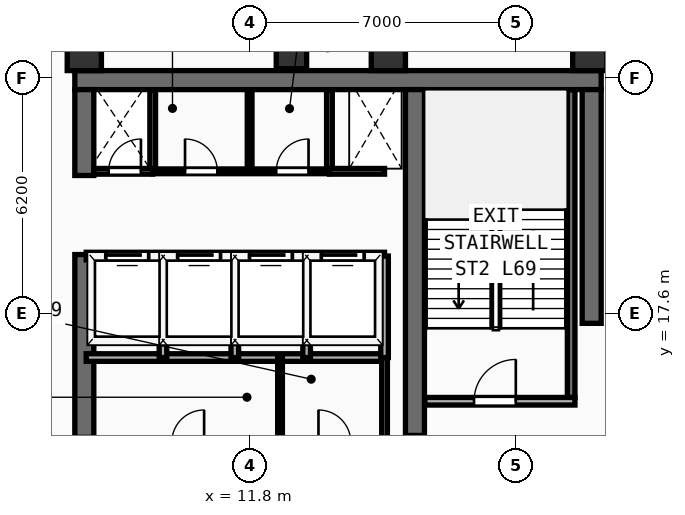
"""IFC4 building model, lengths in metres.
Left out: names, types, materials, properties, quantities, classifications, styles, units other than length and angle.
Written with IfcOpenShell. Run it as: python <this file> out.ifc"""

import sys

from ifc_helpers import new_model, si_unit, direction, frame, frame_2d, origin, origin_2d, place, context, subcontext, project, spatial, rectangle, extrude, element, fill, save


model = new_model("IFC4")
c1 = context("Model", 3, precision=1e-05, world=origin(), true_north=direction((0.0, 1.0)))
c2 = subcontext(c1, "Body", "Model", "MODEL_VIEW")
j1 = project(units=[si_unit("LENGTHUNIT", "METRE"), si_unit("PLANEANGLEUNIT", "RADIAN")], contexts=[c1])
p1 = place(None, origin())
s1 = spatial("IfcSite", under=j1, at=p1, CompositionType="ELEMENT")
p2 = place(p1, origin())
s2 = spatial("IfcBuilding", under=s1, at=p2, CompositionType="ELEMENT")
p3 = place(p2, frame((0.0, 0.0, 270.4)))
s3 = spatial("IfcBuildingStorey", under=s2, at=p3, CompositionType="ELEMENT", Elevation=270.4)
p4 = place(p3, frame((7.2, 23.75, 0.0), z_axis=(0.0, 0.0, 1.0), x_axis=(1.0, 0.0, 0.0)))
e1 = element("IfcWall", 1, at=p4, inside=s3, PredefinedType="SHEAR", context=c2, shape_type="SweptSolid", body=[
    extrude(rectangle(XDim=13.85, YDim=0.5, at=frame_2d((6.925, 0.0))), origin(), (0.0, 0.0, 1.0), 3.56),
])
p5 = place(p3, frame((7.45, 14.35, 0.0), z_axis=(0.0, 0.0, 1.0), x_axis=(0.0, 1.0, 0.0)))
e2 = element("IfcWall", 2, at=p5, inside=s3, PredefinedType="SHEAR", context=c2, shape_type="SweptSolid", body=[
    extrude(rectangle(XDim=4.81, YDim=0.5, at=frame_2d((2.405, 0.0))), origin(), (0.0, 0.0, 1.0), 3.56),
])
p6 = place(p3, frame((7.45, 21.24, 0.0), z_axis=(0.0, 0.0, 1.0), x_axis=(0.0, 1.0, 0.0)))
e3 = element("IfcWall", 3, at=p6, inside=s3, PredefinedType="SHEAR", context=c2, shape_type="SweptSolid", body=[
    extrude(rectangle(XDim=2.26, YDim=0.5, at=frame_2d((1.13, 0.0))), origin(), (0.0, 0.0, 1.0), 3.56),
])
p7 = place(p3, frame((20.8, 17.35, 0.0), z_axis=(0.0, 0.0, 1.0), x_axis=(0.0, 1.0, 0.0)))
e4 = element("IfcWall", 4, at=p7, inside=s3, PredefinedType="SHEAR", context=c2, shape_type="SweptSolid", body=[
    extrude(rectangle(XDim=6.15, YDim=0.5, at=frame_2d((3.075, 0.0))), origin(), (0.0, 0.0, 1.0), 3.56),
])
p8 = place(p3, frame((16.15, 14.4, 0.0), z_axis=(0.0, 0.0, 1.0), x_axis=(0.0, 1.0, 0.0)))
e5 = element("IfcWall", 5, at=p8, inside=s3, PredefinedType="SHEAR", context=c2, shape_type="SweptSolid", body=[
    extrude(rectangle(XDim=9.1, YDim=0.5, at=frame_2d((4.55, 0.0))), origin(), (0.0, 0.0, 1.0), 3.56),
])
for number, where, z_axis, x_axis in (
    (6, (7.45, 24.45, 0.0), (0.0, 0.0, 1.0), (1.0, 0.0, 0.0)),
    (7, (15.45, 24.45, 0.0), (0.0, 0.0, 1.0), (1.0, 0.0, 0.0)),
    (8, (20.75, 24.45, 0.0), (0.0, 0.0, 1.0), (1.0, 0.0, 0.0)),
):
    element("IfcColumn", number, at=place(p3, frame(where, z_axis=z_axis, x_axis=x_axis)), inside=s3, PredefinedType="COLUMN", context=c2, shape_type="SweptSolid", body=[
        extrude(rectangle(XDim=0.9, YDim=0.9, at=origin_2d()), origin(), (0.0, 0.0, 1.0), 3.56),
    ])
p9 = place(p3, frame((12.9, 24.45, 0.0), z_axis=(0.0, 0.0, 1.0), x_axis=(1.0, 0.0, 0.0)))
e9 = element("IfcColumn", 9, at=p9, inside=s3, PredefinedType="COLUMN", context=c2, shape_type="SweptSolid", body=[
    extrude(rectangle(XDim=0.8, YDim=0.8, at=origin_2d()), origin(), (0.0, 0.0, 1.0), 3.56),
])
p10 = place(p3, frame((27.664, 19.754, 0.0), z_axis=(0.0, 0.0, 1.0), x_axis=(-0.707106781187, 0.707106781187, 0.0)))
e10 = element("IfcWall", 10, at=p10, inside=s3, PredefinedType="SOLIDWALL", context=c2, shape_type="SweptSolid", body=[
    extrude(rectangle(XDim=9.207, YDim=0.28, at=frame_2d((4.603, 0.0))), origin(), (0.0, 0.0, 1.0), 3.56),
])
p11 = place(p3, frame((20.26, 15.4, 0.0), z_axis=(0.0, 0.0, 1.0), x_axis=(0.0, 1.0, 0.0)))
e11 = element("IfcWall", 11, at=p11, inside=s3, PredefinedType="SHEAR", context=c2, shape_type="SweptSolid", body=[
    extrude(rectangle(XDim=8.09, YDim=0.2, at=frame_2d((4.045, 0.0))), origin(), (0.0, 0.0, 1.0), 3.56),
])
p12 = place(p3, frame((16.41, 15.3, 0.0), z_axis=(0.0, 0.0, 1.0), x_axis=(1.0, 0.0, 0.0)))
e12 = element("IfcWall", 12, at=p12, inside=s3, PredefinedType="PARTITIONING", context=c2, shape_type="SweptSolid", body=[
    extrude(rectangle(XDim=3.95, YDim=0.2, at=frame_2d((1.975, 0.0))), origin(), (0.0, 0.0, 1.0), 3.56),
])
p13 = place(p12, frame((1.294, 0.0, 0.0)))
e13 = element("IfcOpeningElement", 13, at=p13, cuts=e12, PredefinedType="OPENING", context=c2, shape_type="SweptSolid", body=[
    extrude(rectangle(XDim=1.1, YDim=2.2, at=frame_2d((0.55, 1.1))), frame((0.0, 0.11, 0.0), z_axis=(0.0, -1.0, 0.0), x_axis=(1.0, 0.0, 0.0)), (0.0, 0.0, 1.0), 0.22),
])
p14 = place(p3, frame((7.5, 16.45, 0.0), z_axis=(0.0, 0.0, 1.0), x_axis=(1.0, 0.0, 0.0)))
e14 = element("IfcWall", 14, at=p14, inside=s3, PredefinedType="PARTITIONING", context=c2, shape_type="SweptSolid", body=[
    extrude(rectangle(XDim=7.85, YDim=0.2, at=frame_2d((3.925, 0.0))), origin(), (0.0, 0.0, 1.0), 3.56),
])
p15 = place(p3, frame((15.35, 14.22, 0.0), z_axis=(0.0, 0.0, 1.0), x_axis=(0.0, 1.0, 0.0)))
e15 = element("IfcWall", 15, at=p15, inside=s3, PredefinedType="PARTITIONING", context=c2, shape_type="SweptSolid", body=[
    extrude(rectangle(XDim=2.23, YDim=0.15, at=frame_2d((1.115, 0.0))), origin(), (0.0, 0.0, 1.0), 3.56),
])
p16 = place(p3, frame((12.6, 14.22, 0.0), z_axis=(0.0, 0.0, 1.0), x_axis=(0.0, 1.0, 0.0)))
e16 = element("IfcWall", 16, at=p16, inside=s3, PredefinedType="PARTITIONING", context=c2, shape_type="SweptSolid", body=[
    extrude(rectangle(XDim=2.23, YDim=0.125, at=frame_2d((1.115, 0.0))), origin(), (0.0, 0.0, 1.0), 3.56),
])
p17 = place(p3, frame((7.5, 19.12, 0.0), z_axis=(0.0, 0.0, 1.0), x_axis=(1.0, 0.0, 0.0)))
e17 = element("IfcWall", 17, at=p17, inside=s3, PredefinedType="PARTITIONING", context=c2, shape_type="SweptSolid", body=[
    extrude(rectangle(XDim=7.85, YDim=0.2, at=frame_2d((3.925, 0.0))), origin(), (0.0, 0.0, 1.0), 3.56),
])
p18 = place(p17, frame((0.53, 0.0, 0.0)))
e18 = element("IfcOpeningElement", 18, at=p18, cuts=e17, PredefinedType="OPENING", context=c2, shape_type="SweptSolid", body=[
    extrude(rectangle(XDim=1.1, YDim=2.2, at=frame_2d((0.55, 1.1))), frame((0.0, 0.11, 0.0), z_axis=(0.0, -1.0, 0.0), x_axis=(1.0, 0.0, 0.0)), (0.0, 0.0, 1.0), 0.22),
])
p19 = place(p17, frame((2.42, 0.0, 0.0)))
e19 = element("IfcOpeningElement", 19, at=p19, cuts=e17, PredefinedType="OPENING", context=c2, shape_type="SweptSolid", body=[
    extrude(rectangle(XDim=1.1, YDim=2.2, at=frame_2d((0.55, 1.1))), frame((0.0, 0.11, 0.0), z_axis=(0.0, -1.0, 0.0), x_axis=(1.0, 0.0, 0.0)), (0.0, 0.0, 1.0), 0.22),
])
p20 = place(p17, frame((4.31, 0.0, 0.0)))
e20 = element("IfcOpeningElement", 20, at=p20, cuts=e17, PredefinedType="OPENING", context=c2, shape_type="SweptSolid", body=[
    extrude(rectangle(XDim=1.1, YDim=2.2, at=frame_2d((0.55, 1.1))), frame((0.0, 0.11, 0.0), z_axis=(0.0, -1.0, 0.0), x_axis=(1.0, 0.0, 0.0)), (0.0, 0.0, 1.0), 0.22),
])
p21 = place(p17, frame((6.2, 0.0, 0.0)))
e21 = element("IfcOpeningElement", 21, at=p21, cuts=e17, PredefinedType="OPENING", context=c2, shape_type="SweptSolid", body=[
    extrude(rectangle(XDim=1.1, YDim=2.2, at=frame_2d((0.55, 1.1))), frame((0.0, 0.11, 0.0), z_axis=(0.0, -1.0, 0.0), x_axis=(1.0, 0.0, 0.0)), (0.0, 0.0, 1.0), 0.22),
])
for number, where, z_axis, x_axis in (
    (22, (15.35, 16.45, 0.0), (0.0, 0.0, 1.0), (0.0, 1.0, 0.0)),
    (23, (9.52, 16.45, 0.0), (0.0, 0.0, 1.0), (0.0, 1.0, 0.0)),
    (24, (11.41, 16.45, 0.0), (0.0, 0.0, 1.0), (0.0, 1.0, 0.0)),
    (25, (13.3, 16.45, 0.0), (0.0, 0.0, 1.0), (0.0, 1.0, 0.0)),
):
    element("IfcWall", number, at=place(p3, frame(where, z_axis=z_axis, x_axis=x_axis)), inside=s3, PredefinedType="PARTITIONING", context=c2, shape_type="SweptSolid", body=[
        extrude(rectangle(XDim=2.67, YDim=0.2, at=frame_2d((1.335, 0.0))), origin(), (0.0, 0.0, 1.0), 3.56),
    ])
for number, where, z_axis, x_axis in (
    (26, (9.25, 21.35, 0.0), (0.0, 0.0, 1.0), (0.0, 1.0, 0.0)),
    (27, (13.9, 21.35, 0.0), (0.0, 0.0, 1.0), (0.0, 1.0, 0.0)),
):
    element("IfcWall", number, at=place(p3, frame(where, z_axis=z_axis, x_axis=x_axis)), inside=s3, PredefinedType="PARTITIONING", context=c2, shape_type="SweptSolid", body=[
        extrude(rectangle(XDim=2.13, YDim=0.15, at=frame_2d((1.065, 0.0))), origin(), (0.0, 0.0, 1.0), 3.56),
    ])
p22 = place(p3, frame((7.7, 21.35, 0.0), z_axis=(0.0, 0.0, 1.0), x_axis=(1.0, 0.0, 0.0)))
e28 = element("IfcWall", 28, at=p22, inside=s3, PredefinedType="PARTITIONING", context=c2, shape_type="SweptSolid", body=[
    extrude(rectangle(XDim=1.55, YDim=0.15, at=frame_2d((0.775, 0.0))), origin(), (0.0, 0.0, 1.0), 3.56),
])
p23 = place(p22, frame((0.39, 0.0, 0.0)))
e29 = element("IfcOpeningElement", 29, at=p23, cuts=e28, PredefinedType="OPENING", context=c2, shape_type="SweptSolid", body=[
    extrude(rectangle(XDim=0.85, YDim=2.15, at=frame_2d((0.425, 1.075))), frame((0.0, 0.085, 0.0), z_axis=(0.0, -1.0, 0.0), x_axis=(1.0, 0.0, 0.0)), (0.0, 0.0, 1.0), 0.17),
])
p24 = place(p3, frame((13.9, 21.35, 0.0), z_axis=(0.0, 0.0, 1.0), x_axis=(1.0, 0.0, 0.0)))
e30 = element("IfcWall", 30, at=p24, inside=s3, PredefinedType="PARTITIONING", context=c2, shape_type="SweptSolid", body=[
    extrude(rectangle(XDim=1.45, YDim=0.15, at=frame_2d((0.725, 0.0))), origin(), (0.0, 0.0, 1.0), 3.56),
])
p25 = place(p3, frame((9.25, 21.35, 0.0), z_axis=(0.0, 0.0, 1.0), x_axis=(1.0, 0.0, 0.0)))
e31 = element("IfcWall", 31, at=p25, inside=s3, PredefinedType="PARTITIONING", context=c2, shape_type="SweptSolid", body=[
    extrude(rectangle(XDim=4.65, YDim=0.125, at=frame_2d((2.325, 0.0))), origin(), (0.0, 0.0, 1.0), 3.56),
])
p26 = place(p25, frame((0.85, 0.0, 0.0)))
e32 = element("IfcOpeningElement", 32, at=p26, cuts=e31, PredefinedType="OPENING", context=c2, shape_type="SweptSolid", body=[
    extrude(rectangle(XDim=0.85, YDim=2.15, at=frame_2d((0.425, 1.075))), frame((0.0, 0.073, 0.0), z_axis=(0.0, -1.0, 0.0), x_axis=(1.0, 0.0, 0.0)), (0.0, 0.0, 1.0), 0.145),
])
p27 = place(p25, frame((3.25, 0.0, 0.0)))
e33 = element("IfcOpeningElement", 33, at=p27, cuts=e31, PredefinedType="OPENING", context=c2, shape_type="SweptSolid", body=[
    extrude(rectangle(XDim=0.85, YDim=2.15, at=frame_2d((0.425, 1.075))), frame((0.0, 0.073, 0.0), z_axis=(0.0, -1.0, 0.0), x_axis=(1.0, 0.0, 0.0)), (0.0, 0.0, 1.0), 0.145),
])
p28 = place(p3, frame((11.8, 21.35, 0.0), z_axis=(0.0, 0.0, 1.0), x_axis=(0.0, 1.0, 0.0)))
e34 = element("IfcWall", 34, at=p28, inside=s3, PredefinedType="PARTITIONING", context=c2, shape_type="SweptSolid", body=[
    extrude(rectangle(XDim=2.13, YDim=0.125, at=frame_2d((1.065, 0.0))), origin(), (0.0, 0.0, 1.0), 3.56),
])
p29 = place(p13, origin())
e35 = element("IfcDoor", 35, at=p29, inside=s3, OperationType="SINGLE_SWING_RIGHT", PredefinedType="DOOR", context=c2, shape_type="SweptSolid", body=[
    extrude(rectangle(XDim=1.1, YDim=2.2, at=frame_2d((0.55, 1.1))), frame((0.0, 0.025, 0.0), z_axis=(0.0, -1.0, 0.0), x_axis=(1.0, 0.0, 0.0)), (0.0, 0.0, 1.0), 0.05),
])
fill(e13, e35)
p30 = place(p18, origin())
e36 = element("IfcDoor", 36, at=p30, inside=s3, OperationType="SLIDING_TO_LEFT", PredefinedType="DOOR", context=c2, shape_type="SweptSolid", body=[
    extrude(rectangle(XDim=1.1, YDim=2.2, at=frame_2d((0.55, 1.1))), frame((0.0, 0.025, 0.0), z_axis=(0.0, -1.0, 0.0), x_axis=(1.0, 0.0, 0.0)), (0.0, 0.0, 1.0), 0.05),
])
fill(e18, e36)
p31 = place(p19, origin())
e37 = element("IfcDoor", 37, at=p31, inside=s3, OperationType="SLIDING_TO_LEFT", PredefinedType="DOOR", context=c2, shape_type="SweptSolid", body=[
    extrude(rectangle(XDim=1.1, YDim=2.2, at=frame_2d((0.55, 1.1))), frame((0.0, 0.025, 0.0), z_axis=(0.0, -1.0, 0.0), x_axis=(1.0, 0.0, 0.0)), (0.0, 0.0, 1.0), 0.05),
])
fill(e19, e37)
p32 = place(p20, origin())
e38 = element("IfcDoor", 38, at=p32, inside=s3, OperationType="SLIDING_TO_LEFT", PredefinedType="DOOR", context=c2, shape_type="SweptSolid", body=[
    extrude(rectangle(XDim=1.1, YDim=2.2, at=frame_2d((0.55, 1.1))), frame((0.0, 0.025, 0.0), z_axis=(0.0, -1.0, 0.0), x_axis=(1.0, 0.0, 0.0)), (0.0, 0.0, 1.0), 0.05),
])
fill(e20, e38)
p33 = place(p21, origin())
e39 = element("IfcDoor", 39, at=p33, inside=s3, OperationType="SLIDING_TO_LEFT", PredefinedType="DOOR", context=c2, shape_type="SweptSolid", body=[
    extrude(rectangle(XDim=1.1, YDim=2.2, at=frame_2d((0.55, 1.1))), frame((0.0, 0.025, 0.0), z_axis=(0.0, -1.0, 0.0), x_axis=(1.0, 0.0, 0.0)), (0.0, 0.0, 1.0), 0.05),
])
fill(e21, e39)
p34 = place(p23, origin())
e40 = element("IfcDoor", 40, at=p34, inside=s3, OperationType="SINGLE_SWING_RIGHT", PredefinedType="DOOR", context=c2, shape_type="SweptSolid", body=[
    extrude(rectangle(XDim=0.85, YDim=2.15, at=frame_2d((0.425, 1.075))), frame((0.0, 0.025, 0.0), z_axis=(0.0, -1.0, 0.0), x_axis=(1.0, 0.0, 0.0)), (0.0, 0.0, 1.0), 0.05),
])
fill(e29, e40)
p35 = place(p26, origin())
e41 = element("IfcDoor", 41, at=p35, inside=s3, OperationType="SINGLE_SWING_LEFT", PredefinedType="DOOR", context=c2, shape_type="SweptSolid", body=[
    extrude(rectangle(XDim=0.85, YDim=2.15, at=frame_2d((0.425, 1.075))), frame((0.0, 0.025, 0.0), z_axis=(0.0, -1.0, 0.0), x_axis=(1.0, 0.0, 0.0)), (0.0, 0.0, 1.0), 0.05),
])
fill(e32, e41)
p36 = place(p27, origin())
e42 = element("IfcDoor", 42, at=p36, inside=s3, OperationType="SINGLE_SWING_RIGHT", PredefinedType="DOOR", context=c2, shape_type="SweptSolid", body=[
    extrude(rectangle(XDim=0.85, YDim=2.15, at=frame_2d((0.425, 1.075))), frame((0.0, 0.025, 0.0), z_axis=(0.0, -1.0, 0.0), x_axis=(1.0, 0.0, 0.0)), (0.0, 0.0, 1.0), 0.05),
])
fill(e33, e42)
save(model, sys.argv[1])
